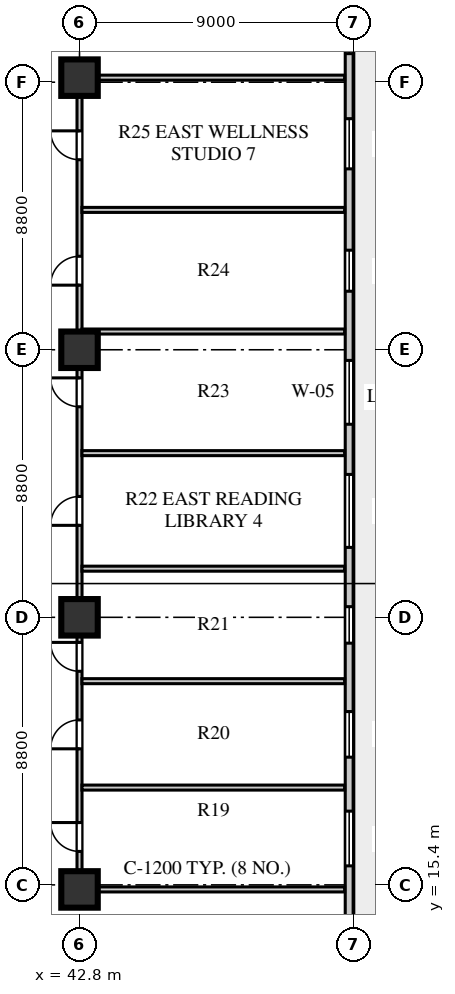
"""IFC4 building model, lengths in metres.
Left out: names, types, materials, properties, quantities, classifications, styles, units other than length and angle.
Written with IfcOpenShell. Run it as: python <this file> out.ifc"""

import sys

from ifc_helpers import new_model, si_unit, direction, frame, frame_2d, origin, origin_2d, place, context, subcontext, project, spatial, rectangle, extrude, element, fill, save


model = new_model("IFC4")
c1 = context("Model", 3, precision=1e-05, world=origin(), true_north=direction((0.0, 1.0)))
c2 = subcontext(c1, "Body", "Model", "MODEL_VIEW")
j1 = project(units=[si_unit("LENGTHUNIT", "METRE"), si_unit("PLANEANGLEUNIT", "RADIAN")], contexts=[c1])
p1 = place(None, origin())
s1 = spatial("IfcSite", under=j1, at=p1, CompositionType="ELEMENT")
p2 = place(p1, origin())
s2 = spatial("IfcBuilding", under=s1, at=p2, CompositionType="ELEMENT")
p3 = place(p2, frame((0.0, 0.0, 66.0)))
s3 = spatial("IfcBuildingStorey", under=s2, at=p3, CompositionType="ELEMENT", Elevation=66.0)
for number, where, z_axis, x_axis in (
    (1, (42.8, 15.25, 0.0), (0.0, 0.0, 1.0), (1.0, 0.0, 0.0)),
    (2, (42.8, 24.2, 0.0), (0.0, 0.0, 1.0), (1.0, 0.0, 0.0)),
    (3, (42.8, 33.0, 0.0), (0.0, 0.0, 1.0), (1.0, 0.0, 0.0)),
    (4, (42.8, 41.95, 0.0), (0.0, 0.0, 1.0), (1.0, 0.0, 0.0)),
):
    element("IfcColumn", number, at=place(p3, frame(where, z_axis=z_axis, x_axis=x_axis)), inside=s3, PredefinedType="COLUMN", context=c2, shape_type="SweptSolid", body=[
        extrude(rectangle(XDim=1.2, YDim=1.2, at=origin_2d()), origin(), (0.0, 0.0, 1.0), 3.72),
    ])
p4 = place(p3, frame((51.67, 12.36, 0.0), z_axis=(0.0, 0.0, 1.0), x_axis=(0.0, 1.0, 0.0)))
e5 = element("IfcWall", 5, at=p4, inside=s3, PredefinedType="SOLIDWALL", context=c2, shape_type="SweptSolid", body=[
    extrude(rectangle(XDim=32.48, YDim=0.26, at=frame_2d((16.24, 0.0))), origin(), (0.0, 0.0, 1.0), 3.72),
])
p5 = place(p4, frame((0.69, 0.0, 0.0)))
e6 = element("IfcOpeningElement", 6, at=p5, cuts=e5, PredefinedType="OPENING", context=c2, shape_type="SweptSolid", body=[
    extrude(rectangle(XDim=1.0, YDim=2.05, at=frame_2d((0.5, 1.025))), frame((0.0, 0.14, 0.0), z_axis=(0.0, -1.0, 0.0), x_axis=(1.0, 0.0, 0.0)), (0.0, 0.0, 1.0), 0.28),
])
p6 = place(p4, frame((3.665, 0.0, 0.8)))
e7 = element("IfcOpeningElement", 7, at=p6, cuts=e5, PredefinedType="OPENING", context=c2, shape_type="SweptSolid", body=[
    extrude(rectangle(XDim=1.8, YDim=2.0, at=frame_2d((0.9, 1.0))), frame((0.0, 0.14, 0.0), z_axis=(0.0, -1.0, 0.0), x_axis=(1.0, 0.0, 0.0)), (0.0, 0.0, 1.0), 0.28),
])
p7 = place(p4, frame((7.24, 0.0, 0.8)))
e8 = element("IfcOpeningElement", 8, at=p7, cuts=e5, PredefinedType="OPENING", context=c2, shape_type="SweptSolid", body=[
    extrude(rectangle(XDim=1.5, YDim=2.0, at=frame_2d((0.75, 1.0))), frame((0.0, 0.14, 0.0), z_axis=(0.0, -1.0, 0.0), x_axis=(1.0, 0.0, 0.0)), (0.0, 0.0, 1.0), 0.28),
])
p8 = place(p4, frame((10.99, 0.0, 0.8)))
e9 = element("IfcOpeningElement", 9, at=p8, cuts=e5, PredefinedType="OPENING", context=c2, shape_type="SweptSolid", body=[
    extrude(rectangle(XDim=1.2, YDim=1.75, at=frame_2d((0.6, 0.875))), frame((0.0, 0.14, 0.0), z_axis=(0.0, -1.0, 0.0), x_axis=(1.0, 0.0, 0.0)), (0.0, 0.0, 1.0), 0.28),
])
p9 = place(p4, frame((14.14, 0.0, 0.8)))
e10 = element("IfcOpeningElement", 10, at=p9, cuts=e5, PredefinedType="OPENING", context=c2, shape_type="SweptSolid", body=[
    extrude(rectangle(XDim=2.4, YDim=2.05, at=frame_2d((1.2, 1.025))), frame((0.0, 0.14, 0.0), z_axis=(0.0, -1.0, 0.0), x_axis=(1.0, 0.0, 0.0)), (0.0, 0.0, 1.0), 0.28),
])
p10 = place(p4, frame((18.19, 0.0, 0.8)))
e11 = element("IfcOpeningElement", 11, at=p10, cuts=e5, PredefinedType="OPENING", context=c2, shape_type="SweptSolid", body=[
    extrude(rectangle(XDim=2.1, YDim=1.95, at=frame_2d((1.05, 0.975))), frame((0.0, 0.14, 0.0), z_axis=(0.0, -1.0, 0.0), x_axis=(1.0, 0.0, 0.0)), (0.0, 0.0, 1.0), 0.28),
])
p11 = place(p4, frame((22.565, 0.0, 0.8)))
e12 = element("IfcOpeningElement", 12, at=p11, cuts=e5, PredefinedType="OPENING", context=c2, shape_type="SweptSolid", body=[
    extrude(rectangle(XDim=1.35, YDim=1.9, at=frame_2d((0.675, 0.95))), frame((0.0, 0.14, 0.0), z_axis=(0.0, -1.0, 0.0), x_axis=(1.0, 0.0, 0.0)), (0.0, 0.0, 1.0), 0.28),
])
p12 = place(p4, frame((26.59, 0.0, 0.8)))
e13 = element("IfcOpeningElement", 13, at=p12, cuts=e5, PredefinedType="OPENING", context=c2, shape_type="SweptSolid", body=[
    extrude(rectangle(XDim=1.65, YDim=1.95, at=frame_2d((0.825, 0.975))), frame((0.0, 0.14, 0.0), z_axis=(0.0, -1.0, 0.0), x_axis=(1.0, 0.0, 0.0)), (0.0, 0.0, 1.0), 0.28),
])
p13 = place(p4, frame((30.38, 0.0, 0.8)))
e14 = element("IfcOpeningElement", 14, at=p13, cuts=e5, PredefinedType="OPENING", context=c2, shape_type="SweptSolid", body=[
    extrude(rectangle(XDim=1.2, YDim=1.75, at=frame_2d((0.6, 0.875))), frame((0.0, 0.14, 0.0), z_axis=(0.0, -1.0, 0.0), x_axis=(1.0, 0.0, 0.0)), (0.0, 0.0, 1.0), 0.28),
])
p14 = place(p3, frame((42.8, 15.25, 0.0), z_axis=(0.0, 0.0, 1.0), x_axis=(0.0, 1.0, 0.0)))
e15 = element("IfcWall", 15, at=p14, inside=s3, PredefinedType="PARTITIONING", context=c2, shape_type="SweptSolid", body=[
    extrude(rectangle(XDim=26.7, YDim=0.165, at=frame_2d((13.35, 0.0))), origin(), (0.0, 0.0, 1.0), 3.02),
])
p15 = place(p14, frame((1.25, 0.0, 0.0)))
e16 = element("IfcOpeningElement", 16, at=p15, cuts=e15, PredefinedType="OPENING", context=c2, shape_type="SweptSolid", body=[
    extrude(rectangle(XDim=0.95, YDim=2.08, at=frame_2d((0.475, 1.04))), frame((0.0, 0.093, 0.0), z_axis=(0.0, -1.0, 0.0), x_axis=(1.0, 0.0, 0.0)), (0.0, 0.0, 1.0), 0.185),
])
p16 = place(p14, frame((4.625, 0.0, 0.0)))
e17 = element("IfcOpeningElement", 17, at=p16, cuts=e15, PredefinedType="OPENING", context=c2, shape_type="SweptSolid", body=[
    extrude(rectangle(XDim=0.95, YDim=2.08, at=frame_2d((0.475, 1.04))), frame((0.0, 0.093, 0.0), z_axis=(0.0, -1.0, 0.0), x_axis=(1.0, 0.0, 0.0)), (0.0, 0.0, 1.0), 0.185),
])
p17 = place(p14, frame((7.175, 0.0, 0.0)))
e18 = element("IfcOpeningElement", 18, at=p17, cuts=e15, PredefinedType="OPENING", context=c2, shape_type="SweptSolid", body=[
    extrude(rectangle(XDim=0.95, YDim=2.08, at=frame_2d((0.475, 1.04))), frame((0.0, 0.093, 0.0), z_axis=(0.0, -1.0, 0.0), x_axis=(1.0, 0.0, 0.0)), (0.0, 0.0, 1.0), 0.185),
])
p18 = place(p14, frame((11.975, 0.0, 0.0)))
e19 = element("IfcOpeningElement", 19, at=p18, cuts=e15, PredefinedType="OPENING", context=c2, shape_type="SweptSolid", body=[
    extrude(rectangle(XDim=0.95, YDim=2.08, at=frame_2d((0.475, 1.04))), frame((0.0, 0.093, 0.0), z_axis=(0.0, -1.0, 0.0), x_axis=(1.0, 0.0, 0.0)), (0.0, 0.0, 1.0), 0.185),
])
p19 = place(p14, frame((15.875, 0.0, 0.0)))
e20 = element("IfcOpeningElement", 20, at=p19, cuts=e15, PredefinedType="OPENING", context=c2, shape_type="SweptSolid", body=[
    extrude(rectangle(XDim=0.95, YDim=2.08, at=frame_2d((0.475, 1.04))), frame((0.0, 0.093, 0.0), z_axis=(0.0, -1.0, 0.0), x_axis=(1.0, 0.0, 0.0)), (0.0, 0.0, 1.0), 0.185),
])
p20 = place(p14, frame((19.875, 0.0, 0.0)))
e21 = element("IfcOpeningElement", 21, at=p20, cuts=e15, PredefinedType="OPENING", context=c2, shape_type="SweptSolid", body=[
    extrude(rectangle(XDim=0.95, YDim=2.08, at=frame_2d((0.475, 1.04))), frame((0.0, 0.093, 0.0), z_axis=(0.0, -1.0, 0.0), x_axis=(1.0, 0.0, 0.0)), (0.0, 0.0, 1.0), 0.185),
])
p21 = place(p14, frame((24.0, 0.0, 0.0)))
e22 = element("IfcOpeningElement", 22, at=p21, cuts=e15, PredefinedType="OPENING", context=c2, shape_type="SweptSolid", body=[
    extrude(rectangle(XDim=0.95, YDim=2.08, at=frame_2d((0.475, 1.04))), frame((0.0, 0.093, 0.0), z_axis=(0.0, -1.0, 0.0), x_axis=(1.0, 0.0, 0.0)), (0.0, 0.0, 1.0), 0.185),
])
for number, where, z_axis, x_axis in (
    (23, (42.88, 15.25, 0.0), (0.0, 0.0, 1.0), (1.0, 0.0, 0.0)),
    (24, (42.88, 41.95, 0.0), (0.0, 0.0, 1.0), (1.0, 0.0, 0.0)),
):
    element("IfcWall", number, at=place(p3, frame(where, z_axis=z_axis, x_axis=x_axis)), inside=s3, PredefinedType="PARTITIONING", context=c2, shape_type="SweptSolid", body=[
        extrude(rectangle(XDim=8.64, YDim=0.165, at=frame_2d((4.32, 0.0))), origin(), (0.0, 0.0, 1.0), 3.22),
    ])
for number, where, z_axis, x_axis in (
    (25, (42.88, 18.6, 0.0), (0.0, 0.0, 1.0), (1.0, 0.0, 0.0)),
    (26, (42.88, 22.1, 0.0), (0.0, 0.0, 1.0), (1.0, 0.0, 0.0)),
    (27, (42.88, 25.8, 0.0), (0.0, 0.0, 1.0), (1.0, 0.0, 0.0)),
    (28, (42.88, 29.6, 0.0), (0.0, 0.0, 1.0), (1.0, 0.0, 0.0)),
    (29, (42.88, 33.6, 0.0), (0.0, 0.0, 1.0), (1.0, 0.0, 0.0)),
    (30, (42.88, 37.6, 0.0), (0.0, 0.0, 1.0), (1.0, 0.0, 0.0)),
):
    element("IfcWall", number, at=place(p3, frame(where, z_axis=z_axis, x_axis=x_axis)), inside=s3, PredefinedType="PARTITIONING", context=c2, shape_type="SweptSolid", body=[
        extrude(rectangle(XDim=8.64, YDim=0.165, at=frame_2d((4.32, 0.0))), origin(), (0.0, 0.0, 1.0), 3.72),
    ])
p22 = place(p6, origin())
e31 = element("IfcWindow", 31, at=p22, inside=s3, PartitioningType="SINGLE_PANEL", PredefinedType="WINDOW", context=c2, shape_type="SweptSolid", body=[
    extrude(rectangle(XDim=1.8, YDim=2.0, at=frame_2d((0.9, 1.0))), frame((0.0, 0.03, 0.0), z_axis=(0.0, -1.0, 0.0), x_axis=(1.0, 0.0, 0.0)), (0.0, 0.0, 1.0), 0.06),
])
fill(e7, e31)
p23 = place(p7, origin())
e32 = element("IfcWindow", 32, at=p23, inside=s3, PartitioningType="SINGLE_PANEL", PredefinedType="WINDOW", context=c2, shape_type="SweptSolid", body=[
    extrude(rectangle(XDim=1.5, YDim=2.0, at=frame_2d((0.75, 1.0))), frame((0.0, 0.03, 0.0), z_axis=(0.0, -1.0, 0.0), x_axis=(1.0, 0.0, 0.0)), (0.0, 0.0, 1.0), 0.06),
])
fill(e8, e32)
p24 = place(p8, origin())
e33 = element("IfcWindow", 33, at=p24, inside=s3, PartitioningType="SINGLE_PANEL", PredefinedType="WINDOW", context=c2, shape_type="SweptSolid", body=[
    extrude(rectangle(XDim=1.2, YDim=1.75, at=frame_2d((0.6, 0.875))), frame((0.0, 0.03, 0.0), z_axis=(0.0, -1.0, 0.0), x_axis=(1.0, 0.0, 0.0)), (0.0, 0.0, 1.0), 0.06),
])
fill(e9, e33)
p25 = place(p9, origin())
e34 = element("IfcWindow", 34, at=p25, inside=s3, PartitioningType="SINGLE_PANEL", PredefinedType="WINDOW", context=c2, shape_type="SweptSolid", body=[
    extrude(rectangle(XDim=2.4, YDim=2.05, at=frame_2d((1.2, 1.025))), frame((0.0, 0.03, 0.0), z_axis=(0.0, -1.0, 0.0), x_axis=(1.0, 0.0, 0.0)), (0.0, 0.0, 1.0), 0.06),
])
fill(e10, e34)
p26 = place(p10, origin())
e35 = element("IfcWindow", 35, at=p26, inside=s3, PartitioningType="SINGLE_PANEL", PredefinedType="WINDOW", context=c2, shape_type="SweptSolid", body=[
    extrude(rectangle(XDim=2.1, YDim=1.95, at=frame_2d((1.05, 0.975))), frame((0.0, 0.03, 0.0), z_axis=(0.0, -1.0, 0.0), x_axis=(1.0, 0.0, 0.0)), (0.0, 0.0, 1.0), 0.06),
])
fill(e11, e35)
p27 = place(p11, origin())
e36 = element("IfcWindow", 36, at=p27, inside=s3, PartitioningType="SINGLE_PANEL", PredefinedType="WINDOW", context=c2, shape_type="SweptSolid", body=[
    extrude(rectangle(XDim=1.35, YDim=1.9, at=frame_2d((0.675, 0.95))), frame((0.0, 0.03, 0.0), z_axis=(0.0, -1.0, 0.0), x_axis=(1.0, 0.0, 0.0)), (0.0, 0.0, 1.0), 0.06),
])
fill(e12, e36)
p28 = place(p12, origin())
e37 = element("IfcWindow", 37, at=p28, inside=s3, PartitioningType="SINGLE_PANEL", PredefinedType="WINDOW", context=c2, shape_type="SweptSolid", body=[
    extrude(rectangle(XDim=1.65, YDim=1.95, at=frame_2d((0.825, 0.975))), frame((0.0, 0.03, 0.0), z_axis=(0.0, -1.0, 0.0), x_axis=(1.0, 0.0, 0.0)), (0.0, 0.0, 1.0), 0.06),
])
fill(e13, e37)
p29 = place(p13, origin())
e38 = element("IfcWindow", 38, at=p29, inside=s3, PartitioningType="SINGLE_PANEL", PredefinedType="WINDOW", context=c2, shape_type="SweptSolid", body=[
    extrude(rectangle(XDim=1.2, YDim=1.75, at=frame_2d((0.6, 0.875))), frame((0.0, 0.03, 0.0), z_axis=(0.0, -1.0, 0.0), x_axis=(1.0, 0.0, 0.0)), (0.0, 0.0, 1.0), 0.06),
])
fill(e14, e38)
p30 = place(p15, origin())
e39 = element("IfcDoor", 39, at=p30, inside=s3, OperationType="SINGLE_SWING_RIGHT", PredefinedType="DOOR", context=c2, shape_type="SweptSolid", body=[
    extrude(rectangle(XDim=0.95, YDim=2.08, at=frame_2d((0.475, 1.04))), frame((0.0, 0.025, 0.0), z_axis=(0.0, -1.0, 0.0), x_axis=(1.0, 0.0, 0.0)), (0.0, 0.0, 1.0), 0.05),
])
fill(e16, e39)
p31 = place(p16, origin())
e40 = element("IfcDoor", 40, at=p31, inside=s3, OperationType="SINGLE_SWING_LEFT", PredefinedType="DOOR", context=c2, shape_type="SweptSolid", body=[
    extrude(rectangle(XDim=0.95, YDim=2.08, at=frame_2d((0.475, 1.04))), frame((0.0, 0.025, 0.0), z_axis=(0.0, -1.0, 0.0), x_axis=(1.0, 0.0, 0.0)), (0.0, 0.0, 1.0), 0.05),
])
fill(e17, e40)
p32 = place(p17, origin())
e41 = element("IfcDoor", 41, at=p32, inside=s3, OperationType="SINGLE_SWING_RIGHT", PredefinedType="DOOR", context=c2, shape_type="SweptSolid", body=[
    extrude(rectangle(XDim=0.95, YDim=2.08, at=frame_2d((0.475, 1.04))), frame((0.0, 0.025, 0.0), z_axis=(0.0, -1.0, 0.0), x_axis=(1.0, 0.0, 0.0)), (0.0, 0.0, 1.0), 0.05),
])
fill(e18, e41)
p33 = place(p18, origin())
e42 = element("IfcDoor", 42, at=p33, inside=s3, OperationType="SINGLE_SWING_LEFT", PredefinedType="DOOR", context=c2, shape_type="SweptSolid", body=[
    extrude(rectangle(XDim=0.95, YDim=2.08, at=frame_2d((0.475, 1.04))), frame((0.0, 0.025, 0.0), z_axis=(0.0, -1.0, 0.0), x_axis=(1.0, 0.0, 0.0)), (0.0, 0.0, 1.0), 0.05),
])
fill(e19, e42)
p34 = place(p19, origin())
e43 = element("IfcDoor", 43, at=p34, inside=s3, OperationType="SINGLE_SWING_RIGHT", PredefinedType="DOOR", context=c2, shape_type="SweptSolid", body=[
    extrude(rectangle(XDim=0.95, YDim=2.08, at=frame_2d((0.475, 1.04))), frame((0.0, 0.025, 0.0), z_axis=(0.0, -1.0, 0.0), x_axis=(1.0, 0.0, 0.0)), (0.0, 0.0, 1.0), 0.05),
])
fill(e20, e43)
p35 = place(p20, origin())
e44 = element("IfcDoor", 44, at=p35, inside=s3, OperationType="SINGLE_SWING_LEFT", PredefinedType="DOOR", context=c2, shape_type="SweptSolid", body=[
    extrude(rectangle(XDim=0.95, YDim=2.08, at=frame_2d((0.475, 1.04))), frame((0.0, 0.025, 0.0), z_axis=(0.0, -1.0, 0.0), x_axis=(1.0, 0.0, 0.0)), (0.0, 0.0, 1.0), 0.05),
])
fill(e21, e44)
p36 = place(p21, origin())
e45 = element("IfcDoor", 45, at=p36, inside=s3, OperationType="SINGLE_SWING_RIGHT", PredefinedType="DOOR", context=c2, shape_type="SweptSolid", body=[
    extrude(rectangle(XDim=0.95, YDim=2.08, at=frame_2d((0.475, 1.04))), frame((0.0, 0.025, 0.0), z_axis=(0.0, -1.0, 0.0), x_axis=(1.0, 0.0, 0.0)), (0.0, 0.0, 1.0), 0.05),
])
fill(e22, e45)
save(model, sys.argv[1])
